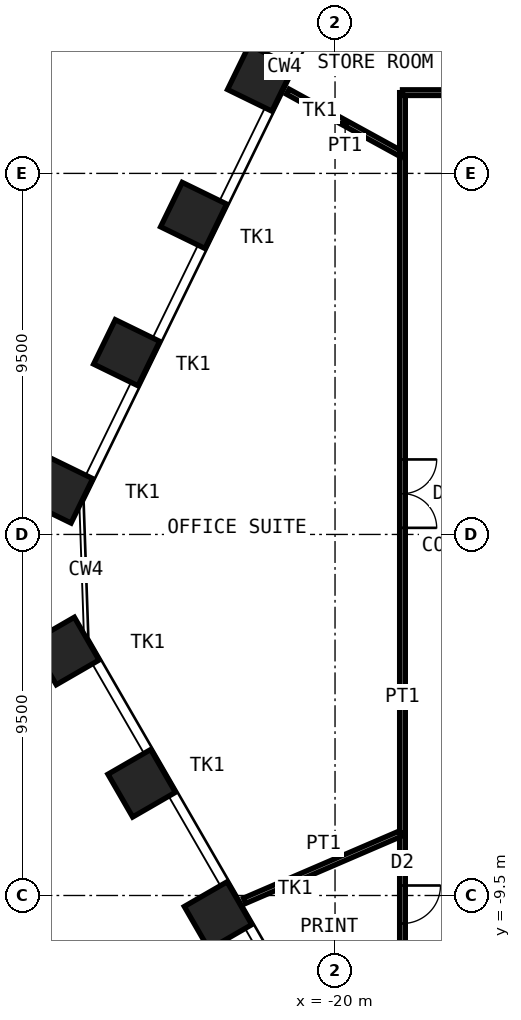
"""IFC4 building model, lengths in metres.
Left out: names, types, materials, properties, quantities, classifications, styles, units other than length and angle.
Written with IfcOpenShell. Run it as: python <this file> out.ifc"""

import sys

from ifc_helpers import new_model, si_unit, direction, frame, frame_2d, origin, origin_2d, place, context, subcontext, project, spatial, rectangle, hollow_rectangle, extrude, element, fill, save


model = new_model("IFC4")
c1 = context("Model", 3, precision=1e-05, world=origin(), true_north=direction((0.0, 1.0)))
c2 = subcontext(c1, "Body", "Model", "MODEL_VIEW")
j1 = project(units=[si_unit("LENGTHUNIT", "METRE"), si_unit("PLANEANGLEUNIT", "RADIAN")], contexts=[c1])
p1 = place(None, origin())
s1 = spatial("IfcSite", under=j1, at=p1, CompositionType="ELEMENT")
p2 = place(p1, origin())
s2 = spatial("IfcBuilding", under=s1, at=p2, CompositionType="ELEMENT")
p3 = place(p2, frame((0.0, 0.0, 170.2)))
s3 = spatial("IfcBuildingStorey", under=s2, at=p3, CompositionType="ELEMENT", Elevation=170.2)
for number, where, z_axis, x_axis in (
    (1, (-23.078, -10.028, 0.0), (0.0, 0.0, 1.0), (0.5, -0.866, 0.0)),
    (2, (-25.087, -6.547, 0.0), (0.0, 0.0, 1.0), (0.5, -0.866, 0.0)),
    (3, (-27.097, -3.067, 0.0), (0.0, 0.0, 1.0), (0.5, -0.866, 0.0)),
    (4, (-27.245, 1.169, 0.0), (0.0, 0.0, 1.0), (-0.438, -0.899, 0.0)),
    (5, (-25.483, 4.781, 0.0), (0.0, 0.0, 1.0), (-0.438, -0.899, 0.0)),
    (6, (-23.721, 8.394, 0.0), (0.0, 0.0, 1.0), (-0.438, -0.899, 0.0)),
    (7, (-21.959, 12.006, 0.0), (0.0, 0.0, 1.0), (-0.438, -0.899, 0.0)),
):
    element("IfcColumn", number, at=place(p3, frame(where, z_axis=z_axis, x_axis=x_axis)), inside=s3, PredefinedType="COLUMN", context=c2, shape_type="SweptSolid", body=[
        extrude(hollow_rectangle(XDim=1.3, YDim=1.3, WallThickness=0.1, at=origin_2d()), origin(), (0.0, 0.0, 1.0), 4.2),
    ])
p4 = place(p3, frame((-18.225, -11.625, 0.0), z_axis=(0.0, 0.0, 1.0), x_axis=(0.0, 1.0, 0.0)))
e8 = element("IfcWall", 8, at=p4, inside=s3, PredefinedType="PARTITIONING", context=c2, shape_type="SweptSolid", body=[
    extrude(rectangle(XDim=3.776, YDim=0.15, at=frame_2d((1.888, 0.0))), origin(), (0.0, 0.0, 1.0), 3.92),
])
p5 = place(p4, frame((1.388, 0.0, 0.0)))
e9 = element("IfcOpeningElement", 9, at=p5, cuts=e8, PredefinedType="OPENING", context=c2, shape_type="SweptSolid", body=[
    extrude(rectangle(XDim=1.0, YDim=2.4, at=frame_2d((0.5, 1.2))), frame((0.0, 0.085, 0.0), z_axis=(0.0, -1.0, 0.0), x_axis=(1.0, 0.0, 0.0)), (0.0, 0.0, 1.0), 0.17),
])
p6 = place(p3, frame((-22.38, -9.638, 0.0), z_axis=(0.0, 0.0, 1.0), x_axis=(0.918428905659, 0.395586078181, 0.0)))
e10 = element("IfcWall", 10, at=p6, inside=s3, PredefinedType="PARTITIONING", context=c2, shape_type="SweptSolid", body=[
    extrude(rectangle(XDim=4.524, YDim=0.15, at=frame_2d((2.262, 0.0))), origin(), (0.0, 0.0, 1.0), 2.72),
])
p7 = place(p3, frame((-18.225, -7.849, 0.0), z_axis=(0.0, 0.0, 1.0), x_axis=(0.0, 1.0, 0.0)))
e11 = element("IfcWall", 11, at=p7, inside=s3, PredefinedType="PARTITIONING", context=c2, shape_type="SweptSolid", body=[
    extrude(rectangle(XDim=17.845, YDim=0.15, at=frame_2d((8.922, 0.0))), origin(), (0.0, 0.0, 1.0), 3.92),
])
p8 = place(p7, frame((8.022, 0.0, 0.0)))
e12 = element("IfcOpeningElement", 12, at=p8, cuts=e11, PredefinedType="OPENING", context=c2, shape_type="SweptSolid", body=[
    extrude(rectangle(XDim=1.8, YDim=2.4, at=frame_2d((0.9, 1.2))), frame((0.0, 0.085, 0.0), z_axis=(0.0, -1.0, 0.0), x_axis=(1.0, 0.0, 0.0)), (0.0, 0.0, 1.0), 0.17),
])
p9 = place(p3, frame((-21.242, 11.651, 0.0), z_axis=(0.0, 0.0, 1.0), x_axis=(0.876768023831, -0.480913539409, 0.0)))
e13 = element("IfcWall", 13, at=p9, inside=s3, PredefinedType="PARTITIONING", context=c2, shape_type="SweptSolid", body=[
    extrude(rectangle(XDim=3.441, YDim=0.15, at=frame_2d((1.721, 0.0))), origin(), (0.0, 0.0, 1.0), 2.72),
])
p10 = place(p3, frame((-18.225, 9.996, 0.0), z_axis=(0.0, 0.0, 1.0), x_axis=(0.0, 1.0, 0.0)))
e14 = element("IfcWall", 14, at=p10, inside=s3, PredefinedType="PARTITIONING", context=c2, shape_type="SweptSolid", body=[
    extrude(rectangle(XDim=1.629, YDim=0.15, at=frame_2d((0.814, 0.0))), origin(), (0.0, 0.0, 1.0), 3.92),
])
p11 = place(p3, frame((-18.225, 11.625, 0.0), z_axis=(0.0, 0.0, 1.0), x_axis=(1.0, 0.0, 0.0)))
e15 = element("IfcWall", 15, at=p11, inside=s3, PredefinedType="PARTITIONING", context=c2, shape_type="SweptSolid", body=[
    extrude(rectangle(XDim=3.368, YDim=0.15, at=frame_2d((1.684, 0.0))), origin(), (0.0, 0.0, 1.0), 3.92),
])
p12 = place(p11, frame((1.184, 0.0, 0.0)))
e16 = element("IfcOpeningElement", 16, at=p12, cuts=e15, PredefinedType="OPENING", context=c2, shape_type="SweptSolid", body=[
    extrude(rectangle(XDim=1.0, YDim=2.4, at=frame_2d((0.5, 1.2))), frame((0.0, 0.085, 0.0), z_axis=(0.0, -1.0, 0.0), x_axis=(1.0, 0.0, 0.0)), (0.0, 0.0, 1.0), 0.17),
])
p13 = place(p3, frame((-19.49, 15.25, 0.0), z_axis=(0.0, 0.0, 1.0), x_axis=(0.787549668605, -0.616251182133, 0.0)))
e17 = element("IfcWall", 17, at=p13, inside=s3, PredefinedType="PARTITIONING", context=c2, shape_type="SweptSolid", body=[
    extrude(rectangle(XDim=5.882, YDim=0.15, at=frame_2d((2.941, 0.0))), origin(), (0.0, 0.0, 1.0), 2.72),
])
p14 = place(p5, origin())
e18 = element("IfcDoor", 18, at=p14, inside=s3, OperationType="SINGLE_SWING_RIGHT", PredefinedType="DOOR", context=c2, shape_type="SweptSolid", body=[
    extrude(rectangle(XDim=1.0, YDim=2.4, at=frame_2d((0.5, 1.2))), frame((0.0, 0.025, 0.0), z_axis=(0.0, -1.0, 0.0), x_axis=(1.0, 0.0, 0.0)), (0.0, 0.0, 1.0), 0.05),
])
fill(e9, e18)
p15 = place(p8, origin())
e19 = element("IfcDoor", 19, at=p15, inside=s3, OperationType="DOUBLE_DOOR_DOUBLE_SWING", PredefinedType="DOOR", context=c2, shape_type="SweptSolid", body=[
    extrude(rectangle(XDim=1.8, YDim=2.4, at=frame_2d((0.9, 1.2))), frame((0.0, 0.025, 0.0), z_axis=(0.0, -1.0, 0.0), x_axis=(1.0, 0.0, 0.0)), (0.0, 0.0, 1.0), 0.05),
])
fill(e12, e19)
save(model, sys.argv[1])
